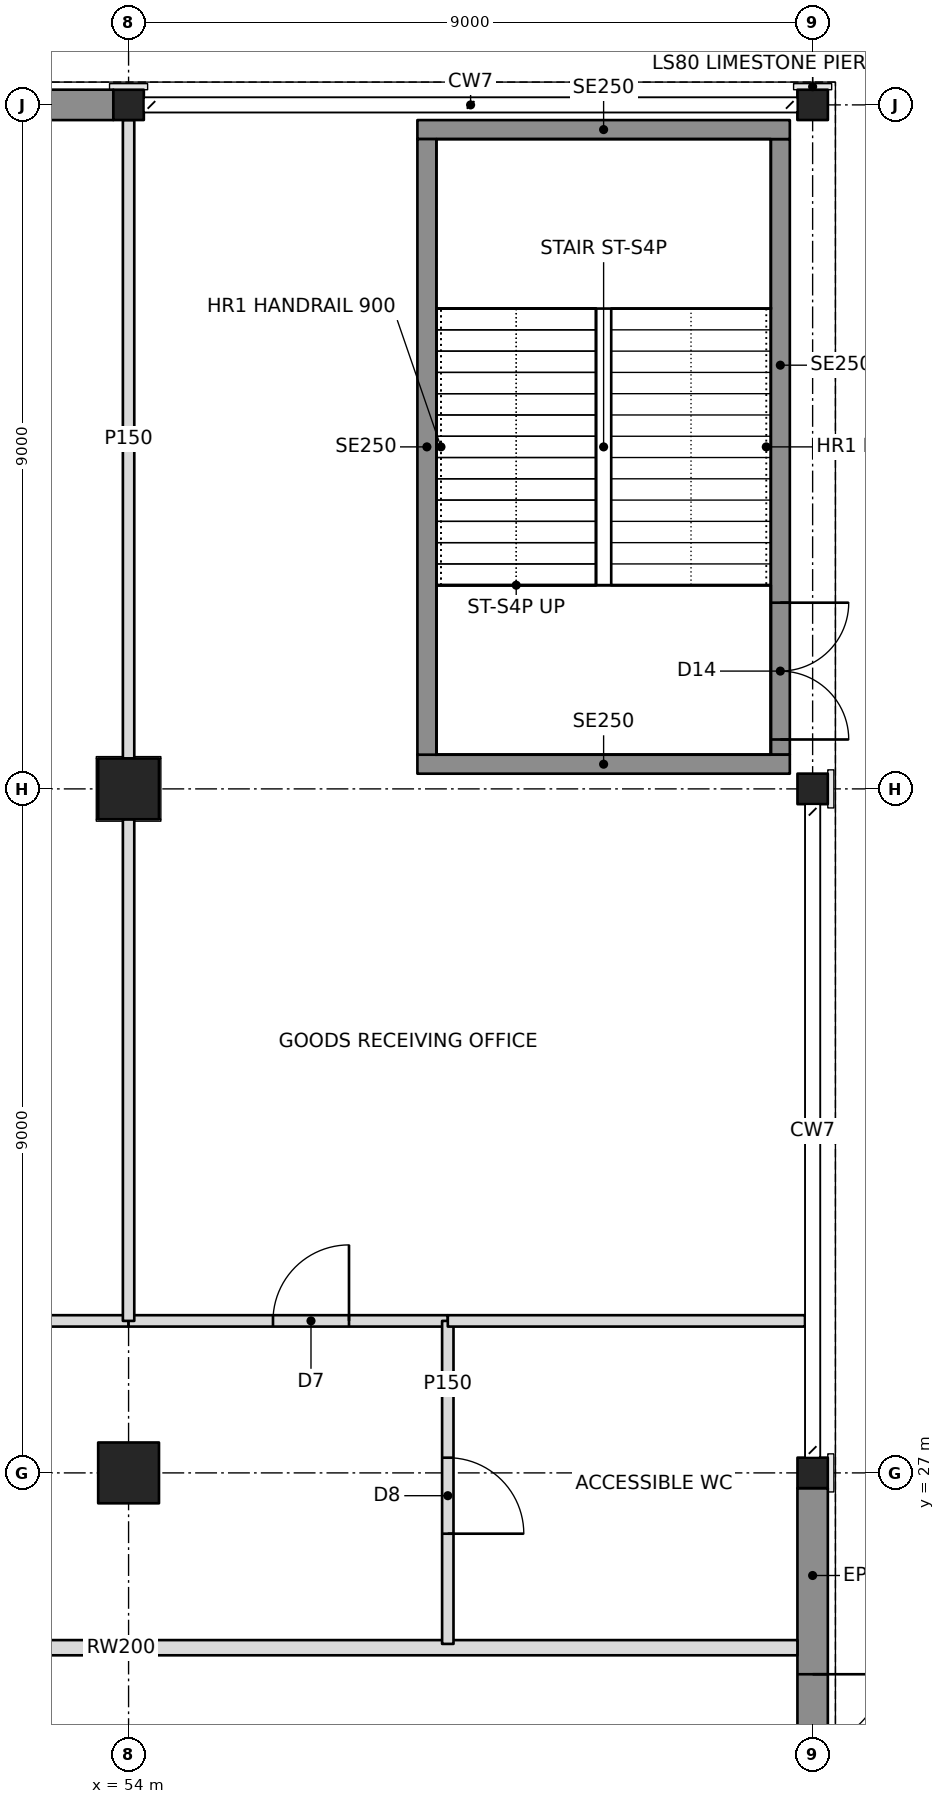
"""IFC4 building model, lengths in metres.
Left out: names, types, materials, properties, quantities, classifications, styles, units other than length and angle.
Written with IfcOpenShell. Run it as: python <this file> out.ifc"""

import sys

from ifc_helpers import new_model, si_unit, direction, frame, frame_2d, origin, origin_2d, place, context, subcontext, project, spatial, rectangle, hollow_rectangle, i_section, extrude, element, fill, save


model = new_model("IFC4")
c1 = context("Model", 3, precision=1e-05, world=origin(), true_north=direction((0.0, 1.0)))
c2 = subcontext(c1, "Body", "Model", "MODEL_VIEW")
j1 = project(units=[si_unit("LENGTHUNIT", "METRE"), si_unit("PLANEANGLEUNIT", "RADIAN")], contexts=[c1])
p1 = place(None, origin())
s1 = spatial("IfcSite", under=j1, at=p1, CompositionType="ELEMENT")
p2 = place(p1, origin())
s2 = spatial("IfcBuilding", under=s1, at=p2, CompositionType="ELEMENT")
p3 = place(p2, origin())
s3 = spatial("IfcBuildingStorey", under=s2, at=p3, CompositionType="ELEMENT", Elevation=0.0)
for number, where, z_axis, x_axis in (
    (1, (54.0, 27.0, 0.0), (0.0, 0.0, 1.0), (0.0, 1.0, 0.0)),
    (2, (54.0, 36.0, 0.0), (0.0, 0.0, 1.0), (1.0, 0.0, 0.0)),
):
    element("IfcColumn", number, at=place(p3, frame(where, z_axis=z_axis, x_axis=x_axis)), inside=s3, PredefinedType="COLUMN", context=c2, shape_type="SweptSolid", body=[
        extrude(hollow_rectangle(XDim=0.8, YDim=0.8, WallThickness=0.1, at=origin_2d()), origin(), (0.0, 0.0, 1.0), 6.0),
    ])
for number, where, z_axis, x_axis in (
    (3, (54.0, 45.0, 0.0), (0.0, 0.0, 1.0), (1.0, 0.0, 0.0)),
    (4, (63.0, 27.0, 0.0), (0.0, 0.0, 1.0), (0.0, 1.0, 0.0)),
    (5, (63.0, 36.0, 0.0), (0.0, 0.0, 1.0), (0.0, 1.0, 0.0)),
    (6, (63.0, 45.0, 0.0), (0.0, 0.0, 1.0), (1.0, 0.0, 0.0)),
):
    element("IfcColumn", number, at=place(p3, frame(where, z_axis=z_axis, x_axis=x_axis)), inside=s3, PredefinedType="COLUMN", context=c2, shape_type="SweptSolid", body=[
        extrude(i_section(OverallWidth=0.401, OverallDepth=0.399, WebThickness=0.025, FlangeThickness=0.04, at=origin_2d()), origin(), (0.0, 0.0, 1.0), 6.0),
    ])
p4 = place(p3, frame((53.799, 45.0, 0.0), z_axis=(0.0, 0.0, 1.0), x_axis=(-1.0, 0.0, 0.0)))
e7 = element("IfcWall", 7, at=p4, inside=s3, PredefinedType="SOLIDWALL", context=c2, shape_type="SweptSolid", body=[
    extrude(rectangle(XDim=8.599, YDim=0.4, at=frame_2d((4.299, 0.0))), origin(), (0.0, 0.0, 1.0), 5.054),
])
p5 = place(p4, frame((2.799, 0.0, 0.0)))
e8 = element("IfcOpeningElement", 8, at=p5, cuts=e7, PredefinedType="OPENING", context=c2, shape_type="SweptSolid", body=[
    extrude(rectangle(XDim=3.0, YDim=4.2, at=frame_2d((1.5, 2.1))), frame((0.0, 0.21, 0.0), z_axis=(0.0, -1.0, 0.0), x_axis=(1.0, 0.0, 0.0)), (0.0, 0.0, 1.0), 0.42),
])
p6 = place(p3, frame((63.0, 18.201, 0.0), z_axis=(0.0, 0.0, 1.0), x_axis=(0.0, 1.0, 0.0)))
e9 = element("IfcWall", 9, at=p6, inside=s3, PredefinedType="SOLIDWALL", context=c2, shape_type="SweptSolid", body=[
    extrude(rectangle(XDim=8.599, YDim=0.4, at=frame_2d((4.299, 0.0))), origin(), (0.0, 0.0, 1.0), 5.054),
])
p7 = place(p6, frame((0.25, 0.0, 0.0)))
e10 = element("IfcOpeningElement", 10, at=p7, cuts=e9, PredefinedType="OPENING", context=c2, shape_type="SweptSolid", body=[
    extrude(rectangle(XDim=1.8, YDim=2.1, at=frame_2d((0.9, 1.05))), frame((0.0, 0.21, 0.0), z_axis=(0.0, -1.0, 0.0), x_axis=(1.0, 0.0, 0.0)), (0.0, 0.0, 1.0), 0.42),
])
p8 = place(p6, frame((2.3, 0.0, 0.0)))
e11 = element("IfcOpeningElement", 11, at=p8, cuts=e9, PredefinedType="OPENING", context=c2, shape_type="SweptSolid", body=[
    extrude(rectangle(XDim=1.8, YDim=2.1, at=frame_2d((0.9, 1.05))), frame((0.0, 0.21, 0.0), z_axis=(0.0, -1.0, 0.0), x_axis=(1.0, 0.0, 0.0)), (0.0, 0.0, 1.0), 0.42),
])
p9 = place(p6, frame((4.35, 0.0, 0.0)))
e12 = element("IfcOpeningElement", 12, at=p9, cuts=e9, PredefinedType="OPENING", context=c2, shape_type="SweptSolid", body=[
    extrude(rectangle(XDim=1.8, YDim=2.1, at=frame_2d((0.9, 1.05))), frame((0.0, 0.21, 0.0), z_axis=(0.0, -1.0, 0.0), x_axis=(1.0, 0.0, 0.0)), (0.0, 0.0, 1.0), 0.42),
])
p10 = place(p3, frame((54.0, 29.0, 0.0), z_axis=(0.0, 0.0, 1.0), x_axis=(-1.0, 0.0, 0.0)))
e13 = element("IfcWall", 13, at=p10, inside=s3, PredefinedType="PARTITIONING", context=c2, shape_type="SweptSolid", body=[
    extrude(rectangle(XDim=17.95, YDim=0.15, at=frame_2d((8.975, 0.0))), origin(), (0.0, 0.0, 1.0), 4.891),
])
p11 = place(p10, frame((8.1, 0.0, 0.0)))
e14 = element("IfcOpeningElement", 14, at=p11, cuts=e13, PredefinedType="OPENING", context=c2, shape_type="SweptSolid", body=[
    extrude(rectangle(XDim=1.8, YDim=2.4, at=frame_2d((0.9, 1.2))), frame((0.0, 0.085, 0.0), z_axis=(0.0, -1.0, 0.0), x_axis=(1.0, 0.0, 0.0)), (0.0, 0.0, 1.0), 0.17),
])
p12 = place(p3, frame((58.2, 29.0, 0.0), z_axis=(0.0, 0.0, 1.0), x_axis=(-1.0, 0.0, 0.0)))
e15 = element("IfcWall", 15, at=p12, inside=s3, PredefinedType="PARTITIONING", context=c2, shape_type="SweptSolid", body=[
    extrude(rectangle(XDim=4.2, YDim=0.15, at=frame_2d((2.1, 0.0))), origin(), (0.0, 0.0, 1.0), 4.891),
])
p13 = place(p12, frame((1.3, 0.0, 0.0)))
e16 = element("IfcOpeningElement", 16, at=p13, cuts=e15, PredefinedType="OPENING", context=c2, shape_type="SweptSolid", body=[
    extrude(rectangle(XDim=1.0, YDim=2.1, at=frame_2d((0.5, 1.05))), frame((0.0, 0.085, 0.0), z_axis=(0.0, -1.0, 0.0), x_axis=(1.0, 0.0, 0.0)), (0.0, 0.0, 1.0), 0.17),
])
p14 = place(p3, frame((54.0, 44.801, 0.0), z_axis=(0.0, 0.0, 1.0), x_axis=(0.0, -1.0, 0.0)))
e17 = element("IfcWall", 17, at=p14, inside=s3, PredefinedType="PARTITIONING", context=c2, shape_type="SweptSolid", body=[
    extrude(rectangle(XDim=8.401, YDim=0.15, at=frame_2d((4.2, 0.0))), origin(), (0.0, 0.0, 1.0), 4.892),
])
p15 = place(p3, frame((54.0, 35.6, 0.0), z_axis=(0.0, 0.0, 1.0), x_axis=(0.0, -1.0, 0.0)))
e18 = element("IfcWall", 18, at=p15, inside=s3, PredefinedType="PARTITIONING", context=c2, shape_type="SweptSolid", body=[
    extrude(rectangle(XDim=6.6, YDim=0.15, at=frame_2d((3.3, 0.0))), origin(), (0.0, 0.0, 1.0), 4.892),
])
p16 = place(p3, frame((58.2, 24.75, 0.0), z_axis=(0.0, 0.0, 1.0), x_axis=(0.0, 1.0, 0.0)))
e19 = element("IfcWall", 19, at=p16, inside=s3, PredefinedType="PARTITIONING", context=c2, shape_type="SweptSolid", body=[
    extrude(rectangle(XDim=4.25, YDim=0.15, at=frame_2d((2.125, 0.0))), origin(), (0.0, 0.0, 1.0), 4.891),
])
p17 = place(p16, frame((1.45, 0.0, 0.0)))
e20 = element("IfcOpeningElement", 20, at=p17, cuts=e19, PredefinedType="OPENING", context=c2, shape_type="SweptSolid", body=[
    extrude(rectangle(XDim=1.0, YDim=2.1, at=frame_2d((0.5, 1.05))), frame((0.0, 0.085, 0.0), z_axis=(0.0, -1.0, 0.0), x_axis=(1.0, 0.0, 0.0)), (0.0, 0.0, 1.0), 0.17),
])
p18 = place(p3, frame((58.2, 29.0, 0.0), z_axis=(0.0, 0.0, 1.0), x_axis=(1.0, 0.0, 0.0)))
e21 = element("IfcWall", 21, at=p18, inside=s3, PredefinedType="PARTITIONING", context=c2, shape_type="SweptSolid", body=[
    extrude(rectangle(XDim=4.7, YDim=0.15, at=frame_2d((2.35, 0.0))), origin(), (0.0, 0.0, 1.0), 5.054),
])
p19 = place(p3, frame((45.0, 24.7, 0.0), z_axis=(0.0, 0.0, 1.0), x_axis=(1.0, 0.0, 0.0)))
e22 = element("IfcWall", 22, at=p19, inside=s3, PredefinedType="PARTITIONING", context=c2, shape_type="SweptSolid", body=[
    extrude(rectangle(XDim=17.8, YDim=0.2, at=frame_2d((8.9, 0.0))), origin(), (0.0, 0.0, 1.0), 4.891),
])
for number, where, z_axis, x_axis in (
    (23, (57.8, 36.325, 0.0), (0.0, 0.0, 1.0), (1.0, 0.0, 0.0)),
    (24, (57.8, 44.675, 0.0), (0.0, 0.0, 1.0), (1.0, 0.0, 0.0)),
):
    element("IfcWall", number, at=place(p3, frame(where, z_axis=z_axis, x_axis=x_axis)), inside=s3, PredefinedType="SOLIDWALL", context=c2, shape_type="SweptSolid", body=[
        extrude(rectangle(XDim=4.9, YDim=0.25, at=frame_2d((2.45, 0.0))), origin(), (0.0, 0.0, 1.0), 5.75),
    ])
p20 = place(p3, frame((57.925, 36.45, 0.0), z_axis=(0.0, 0.0, 1.0), x_axis=(0.0, 1.0, 0.0)))
e25 = element("IfcWall", 25, at=p20, inside=s3, PredefinedType="SOLIDWALL", context=c2, shape_type="SweptSolid", body=[
    extrude(rectangle(XDim=8.1, YDim=0.25, at=frame_2d((4.05, 0.0))), origin(), (0.0, 0.0, 1.0), 5.75),
])
p21 = place(p3, frame((62.575, 36.45, 0.0), z_axis=(0.0, 0.0, 1.0), x_axis=(0.0, 1.0, 0.0)))
e26 = element("IfcWall", 26, at=p21, inside=s3, PredefinedType="SOLIDWALL", context=c2, shape_type="SweptSolid", body=[
    extrude(rectangle(XDim=8.1, YDim=0.25, at=frame_2d((4.05, 0.0))), origin(), (0.0, 0.0, 1.0), 5.75),
])
p22 = place(p21, frame((0.2, 0.0, 0.0)))
e27 = element("IfcOpeningElement", 27, at=p22, cuts=e26, PredefinedType="OPENING", context=c2, shape_type="SweptSolid", body=[
    extrude(rectangle(XDim=1.8, YDim=2.1, at=frame_2d((0.9, 1.05))), frame((0.0, 0.135, 0.0), z_axis=(0.0, -1.0, 0.0), x_axis=(1.0, 0.0, 0.0)), (0.0, 0.0, 1.0), 0.27),
])
p23 = place(p9, frame((1.8, 0.0, 0.0), z_axis=(0.0, 0.0, 1.0), x_axis=(-1.0, 0.0, 0.0)))
e28 = element("IfcDoor", 28, at=p23, inside=s3, OperationType="DOUBLE_DOOR_SINGLE_SWING", PredefinedType="DOOR", context=c2, shape_type="SweptSolid", body=[
    extrude(rectangle(XDim=1.8, YDim=2.1, at=frame_2d((0.9, 1.05))), frame((0.0, 0.025, 0.0), z_axis=(0.0, -1.0, 0.0), x_axis=(1.0, 0.0, 0.0)), (0.0, 0.0, 1.0), 0.05),
])
fill(e12, e28)
p24 = place(p17, frame((1.0, 0.0, 0.0), z_axis=(0.0, 0.0, 1.0), x_axis=(-1.0, 0.0, 0.0)))
e29 = element("IfcDoor", 29, at=p24, inside=s3, OperationType="SINGLE_SWING_RIGHT", PredefinedType="DOOR", context=c2, shape_type="SweptSolid", body=[
    extrude(rectangle(XDim=1.0, YDim=2.1, at=frame_2d((0.5, 1.05))), frame((0.0, 0.025, 0.0), z_axis=(0.0, -1.0, 0.0), x_axis=(1.0, 0.0, 0.0)), (0.0, 0.0, 1.0), 0.05),
])
fill(e20, e29)
p25 = place(p13, frame((1.0, 0.0, 0.0), z_axis=(0.0, 0.0, 1.0), x_axis=(-1.0, 0.0, 0.0)))
e30 = element("IfcDoor", 30, at=p25, inside=s3, OperationType="SINGLE_SWING_RIGHT", PredefinedType="DOOR", context=c2, shape_type="SweptSolid", body=[
    extrude(rectangle(XDim=1.0, YDim=2.1, at=frame_2d((0.5, 1.05))), frame((0.0, 0.025, 0.0), z_axis=(0.0, -1.0, 0.0), x_axis=(1.0, 0.0, 0.0)), (0.0, 0.0, 1.0), 0.05),
])
fill(e16, e30)
p26 = place(p22, frame((1.8, 0.0, 0.0), z_axis=(0.0, 0.0, 1.0), x_axis=(-1.0, 0.0, 0.0)))
e31 = element("IfcDoor", 31, at=p26, inside=s3, OperationType="DOUBLE_DOOR_SINGLE_SWING", PredefinedType="DOOR", context=c2, shape_type="SweptSolid", body=[
    extrude(rectangle(XDim=1.8, YDim=2.1, at=frame_2d((0.9, 1.05))), frame((0.0, 0.025, 0.0), z_axis=(0.0, -1.0, 0.0), x_axis=(1.0, 0.0, 0.0)), (0.0, 0.0, 1.0), 0.05),
])
fill(e27, e31)
save(model, sys.argv[1])
